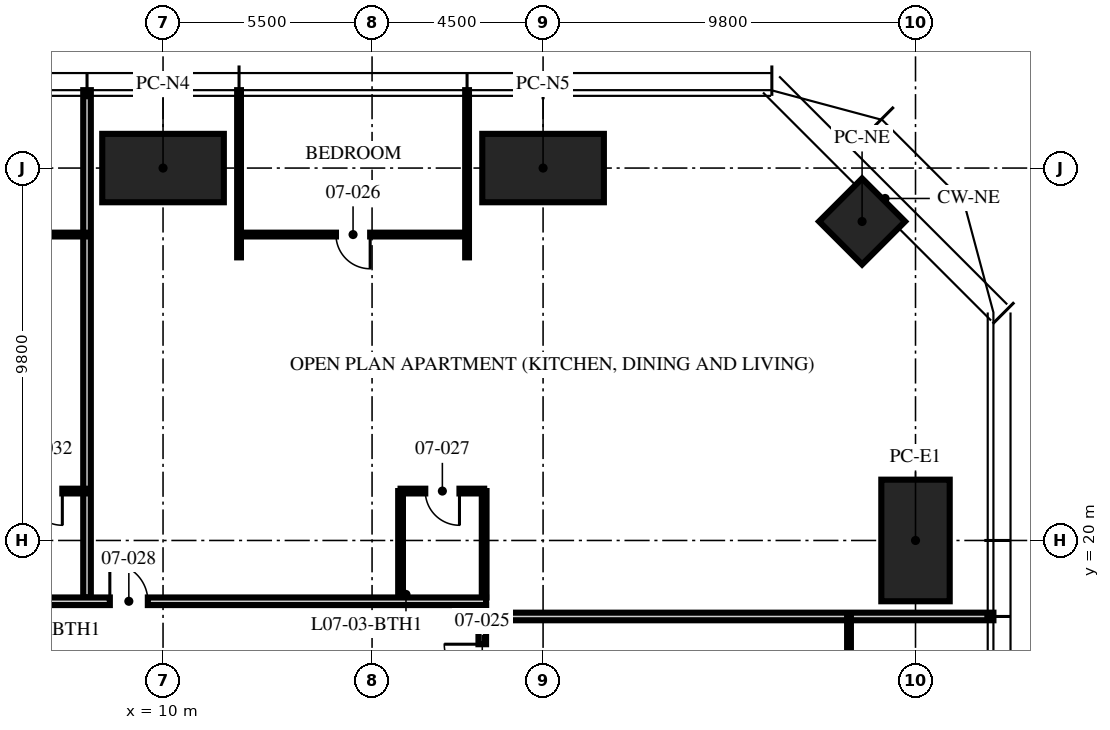
"""IFC4 building model, lengths in metres.
Left out: names, types, materials, properties, quantities, classifications, styles, units other than length and angle.
Written with IfcOpenShell. Run it as: python <this file> out.ifc"""

import sys

from ifc_helpers import new_model, si_unit, direction, frame, frame_2d, origin, origin_2d, place, context, subcontext, project, spatial, rectangle, hollow_rectangle, extrude, element, fill, save


model = new_model("IFC4")
c1 = context("Model", 3, precision=1e-05, world=origin(), true_north=direction((0.0, 1.0)))
c2 = subcontext(c1, "Body", "Model", "MODEL_VIEW")
j1 = project(units=[si_unit("LENGTHUNIT", "METRE"), si_unit("PLANEANGLEUNIT", "RADIAN")], contexts=[c1])
p1 = place(None, origin())
s1 = spatial("IfcSite", under=j1, at=p1, CompositionType="ELEMENT")
p2 = place(p1, origin())
s2 = spatial("IfcBuilding", under=s1, at=p2, CompositionType="ELEMENT")
p3 = place(p2, frame((0.0, 0.0, 32.25)))
s3 = spatial("IfcBuildingStorey", under=s2, at=p3, CompositionType="ELEMENT", Elevation=32.25)
for number, where, z_axis, x_axis in (
    (1, (10.0, 29.8, 0.0), (0.0, 0.0, 1.0), (1.0, 0.0, 0.0)),
    (2, (20.0, 29.8, 0.0), (0.0, 0.0, 1.0), (1.0, 0.0, 0.0)),
    (3, (29.8, 20.0, 0.0), (0.0, 0.0, 1.0), (0.0, 1.0, 0.0)),
):
    element("IfcColumn", number, at=place(p3, frame(where, z_axis=z_axis, x_axis=x_axis)), inside=s3, PredefinedType="COLUMN", context=c2, shape_type="SweptSolid", body=[
        extrude(hollow_rectangle(XDim=3.2, YDim=1.8, WallThickness=0.2, at=origin_2d()), origin(), (0.0, 0.0, 1.0), 3.75),
    ])
p4 = place(p3, frame((28.394, 28.394, 0.0), z_axis=(0.0, 0.0, 1.0), x_axis=(0.707106781187, -0.707106781187, 0.0)))
e4 = element("IfcColumn", 4, at=p4, inside=s3, PredefinedType="COLUMN", context=c2, shape_type="SweptSolid", body=[
    extrude(hollow_rectangle(XDim=1.6, YDim=1.6, WallThickness=0.1, at=origin_2d()), origin(), (0.0, 0.0, 1.0), 3.75),
])
p5 = place(p3, frame((18.5, 18.0, 0.0), z_axis=(0.0, 0.0, 1.0), x_axis=(1.0, 0.0, 0.0)))
e5 = element("IfcWall", 5, at=p5, inside=s3, PredefinedType="PARTITIONING", context=c2, shape_type="SweptSolid", body=[
    extrude(rectangle(XDim=13.35, YDim=0.2, at=frame_2d((6.675, 0.0))), origin(), (0.0, 0.0, 1.0), 2.3),
])
for number, where, z_axis, x_axis in (
    (6, (18.0, 27.45, 0.0), (0.0, 0.0, 1.0), (0.0, 1.0, 0.0)),
    (7, (12.0, 27.45, 0.0), (0.0, 0.0, 1.0), (0.0, 1.0, 0.0)),
):
    element("IfcWall", number, at=place(p3, frame(where, z_axis=z_axis, x_axis=x_axis)), inside=s3, PredefinedType="PARTITIONING", context=c2, shape_type="SweptSolid", body=[
        extrude(rectangle(XDim=4.4, YDim=0.1, at=frame_2d((2.2, 0.0))), origin(), (0.0, 0.0, 1.0), 2.71),
    ])
p6 = place(p3, frame((8.0, 18.5, 0.0), z_axis=(0.0, 0.0, 1.0), x_axis=(0.0, 1.0, 0.0)))
e8 = element("IfcWall", 8, at=p6, inside=s3, PredefinedType="PARTITIONING", context=c2, shape_type="SweptSolid", body=[
    extrude(rectangle(XDim=13.35, YDim=0.2, at=frame_2d((6.675, 0.0))), origin(), (0.0, 0.0, 1.0), 2.71),
])
p7 = place(p3, frame((28.05, 12.0, 0.0), z_axis=(0.0, 0.0, 1.0), x_axis=(0.0, 1.0, 0.0)))
e9 = element("IfcWall", 9, at=p7, inside=s3, PredefinedType="PARTITIONING", context=c2, shape_type="SweptSolid", body=[
    extrude(rectangle(XDim=6.0, YDim=0.1, at=frame_2d((3.0, 0.0))), origin(), (0.0, 0.0, 1.0), 2.61),
])
p8 = place(p7, frame((2.55, 0.0, 0.0)))
e10 = element("IfcOpeningElement", 10, at=p8, cuts=e9, PredefinedType="OPENING", context=c2, shape_type="SweptSolid", body=[
    extrude(rectangle(XDim=0.9, YDim=2.1, at=frame_2d((0.45, 1.05))), frame((0.0, 0.06, 0.0), z_axis=(0.0, -1.0, 0.0), x_axis=(1.0, 0.0, 0.0)), (0.0, 0.0, 1.0), 0.12),
])
p9 = place(p3, frame((18.0, 28.05, 0.0), z_axis=(0.0, 0.0, 1.0), x_axis=(-1.0, 0.0, 0.0)))
e11 = element("IfcWall", 11, at=p9, inside=s3, PredefinedType="PARTITIONING", context=c2, shape_type="SweptSolid", body=[
    extrude(rectangle(XDim=6.0, YDim=0.1, at=frame_2d((3.0, 0.0))), origin(), (0.0, 0.0, 1.0), 2.61),
])
p10 = place(p9, frame((2.55, 0.0, 0.0)))
e12 = element("IfcOpeningElement", 12, at=p10, cuts=e11, PredefinedType="OPENING", context=c2, shape_type="SweptSolid", body=[
    extrude(rectangle(XDim=0.9, YDim=2.1, at=frame_2d((0.45, 1.05))), frame((0.0, 0.06, 0.0), z_axis=(0.0, -1.0, 0.0), x_axis=(1.0, 0.0, 0.0)), (0.0, 0.0, 1.0), 0.12),
])
p11 = place(p3, frame((18.45, 21.3, 0.0), z_axis=(0.0, 0.0, 1.0), x_axis=(-1.0, 0.0, 0.0)))
e13 = element("IfcWall", 13, at=p11, inside=s3, PredefinedType="PARTITIONING", context=c2, shape_type="SweptSolid", body=[
    extrude(rectangle(XDim=2.2, YDim=0.125, at=frame_2d((1.1, 0.0))), origin(), (0.0, 0.0, 1.0), 3.5),
])
p12 = place(p11, frame((0.65, 0.0, 0.0)))
e14 = element("IfcOpeningElement", 14, at=p12, cuts=e13, PredefinedType="OPENING", context=c2, shape_type="SweptSolid", body=[
    extrude(rectangle(XDim=0.9, YDim=2.1, at=frame_2d((0.45, 1.05))), frame((0.0, 0.073, 0.0), z_axis=(0.0, -1.0, 0.0), x_axis=(1.0, 0.0, 0.0)), (0.0, 0.0, 1.0), 0.145),
])
p13 = place(p3, frame((18.45, 18.5, 0.0), z_axis=(0.0, 0.0, 1.0), x_axis=(0.0, 1.0, 0.0)))
e15 = element("IfcWall", 15, at=p13, inside=s3, PredefinedType="PARTITIONING", context=c2, shape_type="SweptSolid", body=[
    extrude(rectangle(XDim=2.8, YDim=0.125, at=frame_2d((1.4, 0.0))), origin(), (0.0, 0.0, 1.0), 2.3),
])
p14 = place(p3, frame((16.25, 18.5, 0.0), z_axis=(0.0, 0.0, 1.0), x_axis=(0.0, 1.0, 0.0)))
e16 = element("IfcWall", 16, at=p14, inside=s3, PredefinedType="PARTITIONING", context=c2, shape_type="SweptSolid", body=[
    extrude(rectangle(XDim=2.8, YDim=0.125, at=frame_2d((1.4, 0.0))), origin(), (0.0, 0.0, 1.0), 3.5),
])
p15 = place(p3, frame((8.0, 28.05, 0.0), z_axis=(0.0, 0.0, 1.0), x_axis=(-1.0, 0.0, 0.0)))
e17 = element("IfcWall", 17, at=p15, inside=s3, PredefinedType="PARTITIONING", context=c2, shape_type="SweptSolid", body=[
    extrude(rectangle(XDim=6.0, YDim=0.1, at=frame_2d((3.0, 0.0))), origin(), (0.0, 0.0, 1.0), 2.61),
])
p16 = place(p15, frame((2.55, 0.0, 0.0)))
e18 = element("IfcOpeningElement", 18, at=p16, cuts=e17, PredefinedType="OPENING", context=c2, shape_type="SweptSolid", body=[
    extrude(rectangle(XDim=0.9, YDim=2.1, at=frame_2d((0.45, 1.05))), frame((0.0, 0.06, 0.0), z_axis=(0.0, -1.0, 0.0), x_axis=(1.0, 0.0, 0.0)), (0.0, 0.0, 1.0), 0.12),
])
p17 = place(p3, frame((8.0, 21.3, 0.0), z_axis=(0.0, 0.0, 1.0), x_axis=(-1.0, 0.0, 0.0)))
e19 = element("IfcWall", 19, at=p17, inside=s3, PredefinedType="PARTITIONING", context=c2, shape_type="SweptSolid", body=[
    extrude(rectangle(XDim=2.2, YDim=0.125, at=frame_2d((1.1, 0.0))), origin(), (0.0, 0.0, 1.0), 3.5),
])
p18 = place(p17, frame((0.65, 0.0, 0.0)))
e20 = element("IfcOpeningElement", 20, at=p18, cuts=e19, PredefinedType="OPENING", context=c2, shape_type="SweptSolid", body=[
    extrude(rectangle(XDim=0.9, YDim=2.1, at=frame_2d((0.45, 1.05))), frame((0.0, 0.073, 0.0), z_axis=(0.0, -1.0, 0.0), x_axis=(1.0, 0.0, 0.0)), (0.0, 0.0, 1.0), 0.145),
])
p19 = place(p3, frame((18.4, -10.0, 0.0), z_axis=(0.0, 0.0, 1.0), x_axis=(0.0, 1.0, 0.0)))
e21 = element("IfcWall", 21, at=p19, inside=s3, PredefinedType="PARTITIONING", context=c2, shape_type="SweptSolid", body=[
    extrude(rectangle(XDim=28.3, YDim=0.2, at=frame_2d((14.15, 0.0))), origin(), (0.0, 0.0, 1.0), 2.3),
])
p20 = place(p19, frame((6.57, 0.0, 0.0)))
e22 = element("IfcOpeningElement", 22, at=p20, cuts=e21, PredefinedType="OPENING", context=c2, shape_type="SweptSolid", body=[
    extrude(rectangle(XDim=1.0, YDim=2.2, at=frame_2d((0.5, 1.1))), frame((0.0, 0.11, 0.0), z_axis=(0.0, -1.0, 0.0), x_axis=(1.0, 0.0, 0.0)), (0.0, 0.0, 1.0), 0.22),
])
p21 = place(p19, frame((26.27, 0.0, 0.0)))
e23 = element("IfcOpeningElement", 23, at=p21, cuts=e21, PredefinedType="OPENING", context=c2, shape_type="SweptSolid", body=[
    extrude(rectangle(XDim=1.0, YDim=2.2, at=frame_2d((0.5, 1.1))), frame((0.0, 0.11, 0.0), z_axis=(0.0, -1.0, 0.0), x_axis=(1.0, 0.0, 0.0)), (0.0, 0.0, 1.0), 0.22),
])
p22 = place(p3, frame((-18.5, 18.4, 0.0), z_axis=(0.0, 0.0, 1.0), x_axis=(1.0, 0.0, 0.0)))
e24 = element("IfcWall", 24, at=p22, inside=s3, PredefinedType="PARTITIONING", context=c2, shape_type="SweptSolid", body=[
    extrude(rectangle(XDim=37.0, YDim=0.2, at=frame_2d((18.5, 0.0))), origin(), (0.0, 0.0, 1.0), 2.3),
])
p23 = place(p22, frame((27.1, 0.0, 0.0)))
e25 = element("IfcOpeningElement", 25, at=p23, cuts=e24, PredefinedType="OPENING", context=c2, shape_type="SweptSolid", body=[
    extrude(rectangle(XDim=1.0, YDim=2.2, at=frame_2d((0.5, 1.1))), frame((0.0, 0.11, 0.0), z_axis=(0.0, -1.0, 0.0), x_axis=(1.0, 0.0, 0.0)), (0.0, 0.0, 1.0), 0.22),
])
p24 = place(p22, frame((11.23, 0.0, 0.0)))
e26 = element("IfcOpeningElement", 26, at=p24, cuts=e24, PredefinedType="OPENING", context=c2, shape_type="SweptSolid", body=[
    extrude(rectangle(XDim=1.0, YDim=2.2, at=frame_2d((0.5, 1.1))), frame((0.0, 0.11, 0.0), z_axis=(0.0, -1.0, 0.0), x_axis=(1.0, 0.0, 0.0)), (0.0, 0.0, 1.0), 0.22),
])
p25 = place(p22, frame((6.93, 0.0, 0.0)))
e27 = element("IfcOpeningElement", 27, at=p25, cuts=e24, PredefinedType="OPENING", context=c2, shape_type="SweptSolid", body=[
    extrude(rectangle(XDim=1.0, YDim=2.2, at=frame_2d((0.5, 1.1))), frame((0.0, 0.11, 0.0), z_axis=(0.0, -1.0, 0.0), x_axis=(1.0, 0.0, 0.0)), (0.0, 0.0, 1.0), 0.22),
])
p26 = place(p22, frame((0.93, 0.0, 0.0)))
e28 = element("IfcOpeningElement", 28, at=p26, cuts=e24, PredefinedType="OPENING", context=c2, shape_type="SweptSolid", body=[
    extrude(rectangle(XDim=1.0, YDim=2.2, at=frame_2d((0.5, 1.1))), frame((0.0, 0.11, 0.0), z_axis=(0.0, -1.0, 0.0), x_axis=(1.0, 0.0, 0.0)), (0.0, 0.0, 1.0), 0.22),
])
p27 = place(p21, origin())
e29 = element("IfcDoor", 29, at=p27, inside=s3, OperationType="SINGLE_SWING_RIGHT", PredefinedType="DOOR", context=c2, shape_type="SweptSolid", body=[
    extrude(rectangle(XDim=1.0, YDim=2.2, at=frame_2d((0.5, 1.1))), frame((0.0, 0.025, 0.0), z_axis=(0.0, -1.0, 0.0), x_axis=(1.0, 0.0, 0.0)), (0.0, 0.0, 1.0), 0.05),
])
fill(e23, e29)
p28 = place(p10, origin())
e30 = element("IfcDoor", 30, at=p28, inside=s3, OperationType="SINGLE_SWING_LEFT", PredefinedType="DOOR", context=c2, shape_type="SweptSolid", body=[
    extrude(rectangle(XDim=0.9, YDim=2.1, at=frame_2d((0.45, 1.05))), frame((0.0, 0.025, 0.0), z_axis=(0.0, -1.0, 0.0), x_axis=(1.0, 0.0, 0.0)), (0.0, 0.0, 1.0), 0.05),
])
fill(e12, e30)
p29 = place(p12, origin())
e31 = element("IfcDoor", 31, at=p29, inside=s3, OperationType="SINGLE_SWING_LEFT", PredefinedType="DOOR", context=c2, shape_type="SweptSolid", body=[
    extrude(rectangle(XDim=0.9, YDim=2.1, at=frame_2d((0.45, 1.05))), frame((0.0, 0.025, 0.0), z_axis=(0.0, -1.0, 0.0), x_axis=(1.0, 0.0, 0.0)), (0.0, 0.0, 1.0), 0.05),
])
fill(e14, e31)
p30 = place(p23, origin())
e32 = element("IfcDoor", 32, at=p30, inside=s3, OperationType="SINGLE_SWING_LEFT", PredefinedType="DOOR", context=c2, shape_type="SweptSolid", body=[
    extrude(rectangle(XDim=1.0, YDim=2.2, at=frame_2d((0.5, 1.1))), frame((0.0, 0.025, 0.0), z_axis=(0.0, -1.0, 0.0), x_axis=(1.0, 0.0, 0.0)), (0.0, 0.0, 1.0), 0.05),
])
fill(e25, e32)
p31 = place(p18, origin())
e33 = element("IfcDoor", 33, at=p31, inside=s3, OperationType="SINGLE_SWING_LEFT", PredefinedType="DOOR", context=c2, shape_type="SweptSolid", body=[
    extrude(rectangle(XDim=0.9, YDim=2.1, at=frame_2d((0.45, 1.05))), frame((0.0, 0.025, 0.0), z_axis=(0.0, -1.0, 0.0), x_axis=(1.0, 0.0, 0.0)), (0.0, 0.0, 1.0), 0.05),
])
fill(e20, e33)
save(model, sys.argv[1])
